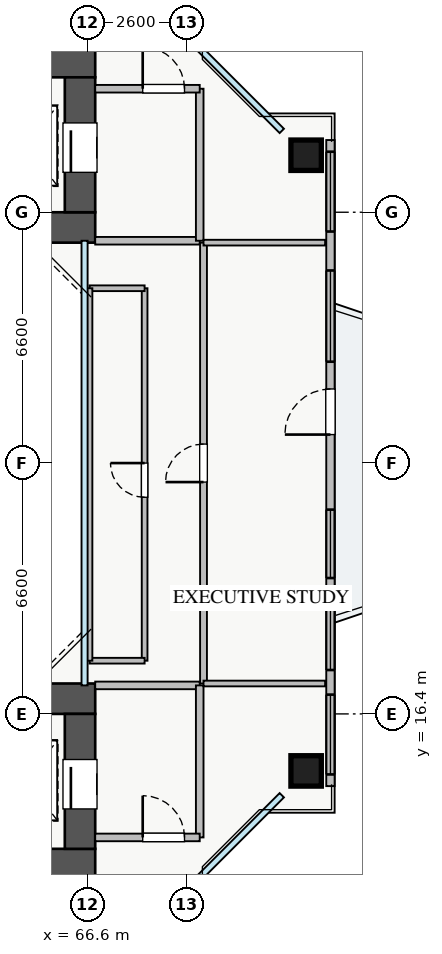
"""IFC4 building model, lengths in metres.
Left out: names, types, materials, properties, quantities, classifications, styles, units other than length and angle.
Written with IfcOpenShell. Run it as: python <this file> out.ifc"""

import sys

from ifc_helpers import new_model, si_unit, direction, frame, frame_2d, origin, origin_2d, place, context, subcontext, project, spatial, rectangle, extrude, source, transform, mapped, element, fill, save


model = new_model("IFC4")
c1 = context("Model", 3, precision=1e-05, world=origin(), true_north=direction((0.0, 1.0)))
c2 = subcontext(c1, "Body", "Model", "MODEL_VIEW")
j1 = project(units=[si_unit("LENGTHUNIT", "METRE"), si_unit("PLANEANGLEUNIT", "RADIAN")], contexts=[c1])
p1 = place(None, origin())
s1 = spatial("IfcSite", under=j1, at=p1, CompositionType="ELEMENT")
p2 = place(p1, origin())
s2 = spatial("IfcBuilding", under=s1, at=p2, CompositionType="ELEMENT")
p3 = place(p2, frame((0.0, 0.0, 73.0)))
s3 = spatial("IfcBuildingStorey", under=s2, at=p3, CompositionType="ELEMENT", Elevation=73.0)
p4 = place(p3, frame((54.2, 29.2, 0.0), z_axis=(0.0, 0.0, 1.0), x_axis=(1.0, 0.0, 0.0)))
e1 = element("IfcWall", 1, at=p4, inside=s3, PredefinedType="SHEAR", context=c2, shape_type="SweptSolid", body=[
    extrude(rectangle(XDim=12.6, YDim=0.8, at=frame_2d((6.3, 0.0))), origin(), (0.0, 0.0, 1.0), 3.25),
])
p5 = place(p3, frame((54.2, 33.55, 0.0), z_axis=(0.0, 0.0, 1.0), x_axis=(1.0, 0.0, 0.0)))
e2 = element("IfcWall", 2, at=p5, inside=s3, PredefinedType="SHEAR", context=c2, shape_type="SweptSolid", body=[
    extrude(rectangle(XDim=12.6, YDim=0.8, at=frame_2d((6.3, 0.0))), origin(), (0.0, 0.0, 1.0), 3.25),
])
p6 = place(p5, frame((8.2, 0.0, 0.0)))
e3 = element("IfcOpeningElement", 3, at=p6, cuts=e2, PredefinedType="OPENING", context=c2, shape_type="SweptSolid", body=[
    extrude(rectangle(XDim=1.1, YDim=2.05, at=frame_2d((0.55, 1.025))), frame((0.0, 0.41, 0.0), z_axis=(0.0, -1.0, 0.0), x_axis=(1.0, 0.0, 0.0)), (0.0, 0.0, 1.0), 0.82),
])
p7 = place(p3, frame((66.4, 29.6, 0.0), z_axis=(0.0, 0.0, 1.0), x_axis=(0.0, 1.0, 0.0)))
e4 = element("IfcWall", 4, at=p7, inside=s3, PredefinedType="SHEAR", context=c2, shape_type="SweptSolid", body=[
    extrude(rectangle(XDim=3.55, YDim=0.8, at=frame_2d((1.775, 0.0))), origin(), (0.0, 0.0, 1.0), 3.25),
])
p8 = place(p7, frame((1.05, 0.0, 0.0)))
e5 = element("IfcOpeningElement", 5, at=p8, cuts=e4, PredefinedType="OPENING", context=c2, shape_type="SweptSolid", body=[
    extrude(rectangle(XDim=1.3, YDim=2.05, at=frame_2d((0.65, 1.025))), frame((0.0, 0.41, 0.0), z_axis=(0.0, -1.0, 0.0), x_axis=(1.0, 0.0, 0.0)), (0.0, 0.0, 1.0), 0.82),
])
p9 = place(p3, frame((54.2, 12.45, 0.0), z_axis=(0.0, 0.0, 1.0), x_axis=(1.0, 0.0, 0.0)))
e6 = element("IfcWall", 6, at=p9, inside=s3, PredefinedType="SHEAR", context=c2, shape_type="SweptSolid", body=[
    extrude(rectangle(XDim=12.6, YDim=0.8, at=frame_2d((6.3, 0.0))), origin(), (0.0, 0.0, 1.0), 3.25),
])
p10 = place(p9, frame((8.2, 0.0, 0.0)))
e7 = element("IfcOpeningElement", 7, at=p10, cuts=e6, PredefinedType="OPENING", context=c2, shape_type="SweptSolid", body=[
    extrude(rectangle(XDim=1.1, YDim=2.05, at=frame_2d((0.55, 1.025))), frame((0.0, 0.41, 0.0), z_axis=(0.0, -1.0, 0.0), x_axis=(1.0, 0.0, 0.0)), (0.0, 0.0, 1.0), 0.82),
])
p11 = place(p3, frame((54.2, 16.8, 0.0), z_axis=(0.0, 0.0, 1.0), x_axis=(1.0, 0.0, 0.0)))
e8 = element("IfcWall", 8, at=p11, inside=s3, PredefinedType="SHEAR", context=c2, shape_type="SweptSolid", body=[
    extrude(rectangle(XDim=12.6, YDim=0.8, at=frame_2d((6.3, 0.0))), origin(), (0.0, 0.0, 1.0), 3.25),
])
p12 = place(p3, frame((66.4, 12.85, 0.0), z_axis=(0.0, 0.0, 1.0), x_axis=(0.0, 1.0, 0.0)))
e9 = element("IfcWall", 9, at=p12, inside=s3, PredefinedType="SHEAR", context=c2, shape_type="SweptSolid", body=[
    extrude(rectangle(XDim=3.55, YDim=0.8, at=frame_2d((1.775, 0.0))), origin(), (0.0, 0.0, 1.0), 3.25),
])
p13 = place(p12, frame((1.05, 0.0, 0.0)))
e10 = element("IfcOpeningElement", 10, at=p13, cuts=e9, PredefinedType="OPENING", context=c2, shape_type="SweptSolid", body=[
    extrude(rectangle(XDim=1.3, YDim=2.05, at=frame_2d((0.65, 1.025))), frame((0.0, 0.41, 0.0), z_axis=(0.0, -1.0, 0.0), x_axis=(1.0, 0.0, 0.0)), (0.0, 0.0, 1.0), 0.82),
])
m1 = source(origin(), c2, "Body", "SweptSolid", [
    extrude(rectangle(XDim=0.8, YDim=0.8, at=origin_2d()), origin(), (0.0, 0.0, 1.0), 3.25),
])
for number, where, z_axis, x_axis in (
    (11, (72.35, 14.9, 0.0), (0.0, 0.0, 1.0), (1.0, 0.0, 0.0)),
    (12, (72.35, 31.1, 0.0), (0.0, 0.0, 1.0), (1.0, 0.0, 0.0)),
):
    element("IfcColumn", number, at=place(p3, frame(where, z_axis=z_axis, x_axis=x_axis)), inside=s3, PredefinedType="COLUMN", context=c2, shape_type="MappedRepresentation", body=[
        mapped(m1, transform((0.0, 0.0, 0.0), x_axis=(1.0, 0.0, 0.0), y_axis=(0.0, 1.0, 0.0), z_axis=(0.0, 0.0, 1.0), scale=1.0)),
    ])
p14 = place(p3, frame((72.99, 14.5, 0.0), z_axis=(0.0, 0.0, 1.0), x_axis=(0.0, 1.0, 0.0)))
e13 = element("IfcWall", 13, at=p14, inside=s3, PredefinedType="STANDARD", context=c2, shape_type="SweptSolid", body=[
    extrude(rectangle(XDim=17.0, YDim=0.22, at=frame_2d((8.5, 0.0))), origin(), (0.0, 0.0, 1.0), 2.61),
])
p15 = place(p14, frame((9.25, 0.0, 0.0)))
e14 = element("IfcOpeningElement", 14, at=p15, cuts=e13, PredefinedType="OPENING", context=c2, shape_type="SweptSolid", body=[
    extrude(rectangle(XDim=1.2, YDim=2.1, at=frame_2d((0.6, 1.05))), frame((0.0, 0.12, 0.0), z_axis=(0.0, -1.0, 0.0), x_axis=(1.0, 0.0, 0.0)), (0.0, 0.0, 1.0), 0.24),
])
p16 = place(p14, frame((0.308, 0.0, 0.9)))
e15 = element("IfcOpeningElement", 15, at=p16, cuts=e13, PredefinedType="OPENING", context=c2, shape_type="SweptSolid", body=[
    extrude(rectangle(XDim=2.1, YDim=1.5, at=frame_2d((1.05, 0.75))), frame((0.0, 0.12, 0.0), z_axis=(0.0, -1.0, 0.0), x_axis=(1.0, 0.0, 0.0)), (0.0, 0.0, 1.0), 0.24),
])
p17 = place(p14, frame((5.475, 0.0, 0.9)))
e16 = element("IfcOpeningElement", 16, at=p17, cuts=e13, PredefinedType="OPENING", context=c2, shape_type="SweptSolid", body=[
    extrude(rectangle(XDim=1.8, YDim=1.45, at=frame_2d((0.9, 0.725))), frame((0.0, 0.12, 0.0), z_axis=(0.0, -1.0, 0.0), x_axis=(1.0, 0.0, 0.0)), (0.0, 0.0, 1.0), 0.24),
])
p18 = place(p14, frame((14.593, 0.0, 0.9)))
e17 = element("IfcOpeningElement", 17, at=p18, cuts=e13, PredefinedType="OPENING", context=c2, shape_type="SweptSolid", body=[
    extrude(rectangle(XDim=2.1, YDim=1.5, at=frame_2d((1.05, 0.75))), frame((0.0, 0.12, 0.0), z_axis=(0.0, -1.0, 0.0), x_axis=(1.0, 0.0, 0.0)), (0.0, 0.0, 1.0), 0.24),
])
p19 = place(p14, frame((3.055, 0.0, 0.9)))
e18 = element("IfcOpeningElement", 18, at=p19, cuts=e13, PredefinedType="OPENING", context=c2, shape_type="SweptSolid", body=[
    extrude(rectangle(XDim=2.1, YDim=1.5, at=frame_2d((1.05, 0.75))), frame((0.0, 0.12, 0.0), z_axis=(0.0, -1.0, 0.0), x_axis=(1.0, 0.0, 0.0)), (0.0, 0.0, 1.0), 0.24),
])
p20 = place(p14, frame((11.167, 0.0, 0.9)))
e19 = element("IfcOpeningElement", 19, at=p20, cuts=e13, PredefinedType="OPENING", context=c2, shape_type="SweptSolid", body=[
    extrude(rectangle(XDim=2.4, YDim=1.5, at=frame_2d((1.2, 0.75))), frame((0.0, 0.12, 0.0), z_axis=(0.0, -1.0, 0.0), x_axis=(1.0, 0.0, 0.0)), (0.0, 0.0, 1.0), 0.24),
])
p21 = place(p3, frame((66.8, 28.85, 0.0), z_axis=(0.0, 0.0, 1.0), x_axis=(1.0, 0.0, 0.0)))
e20 = element("IfcWall", 20, at=p21, inside=s3, PredefinedType="PARTITIONING", context=c2, shape_type="SweptSolid", body=[
    extrude(rectangle(XDim=2.75, YDim=0.2, at=frame_2d((1.375, 0.0))), origin(), (0.0, 0.0, 1.0), 3.07),
])
p22 = place(p3, frame((69.55, 28.85, 0.0), z_axis=(0.0, 0.0, 1.0), x_axis=(0.0, 1.0, 0.0)))
e21 = element("IfcWall", 21, at=p22, inside=s3, PredefinedType="PARTITIONING", context=c2, shape_type="SweptSolid", body=[
    extrude(rectangle(XDim=4.0, YDim=0.2, at=frame_2d((2.0, 0.0))), origin(), (0.0, 0.0, 1.0), 3.07),
])
p23 = place(p3, frame((66.8, 32.85, 0.0), z_axis=(0.0, 0.0, 1.0), x_axis=(1.0, 0.0, 0.0)))
e22 = element("IfcWall", 22, at=p23, inside=s3, PredefinedType="PARTITIONING", context=c2, shape_type="SweptSolid", body=[
    extrude(rectangle(XDim=2.75, YDim=0.2, at=frame_2d((1.375, 0.0))), origin(), (0.0, 0.0, 1.0), 3.07),
])
p24 = place(p23, frame((1.25, 0.0, 0.0)))
e23 = element("IfcOpeningElement", 23, at=p24, cuts=e22, PredefinedType="OPENING", context=c2, shape_type="SweptSolid", body=[
    extrude(rectangle(XDim=1.1, YDim=2.05, at=frame_2d((0.55, 1.025))), frame((0.0, 0.11, 0.0), z_axis=(0.0, -1.0, 0.0), x_axis=(1.0, 0.0, 0.0)), (0.0, 0.0, 1.0), 0.22),
])
p25 = place(p3, frame((66.8, 17.15, 0.0), z_axis=(0.0, 0.0, 1.0), x_axis=(1.0, 0.0, 0.0)))
e24 = element("IfcWall", 24, at=p25, inside=s3, PredefinedType="PARTITIONING", context=c2, shape_type="SweptSolid", body=[
    extrude(rectangle(XDim=2.75, YDim=0.2, at=frame_2d((1.375, 0.0))), origin(), (0.0, 0.0, 1.0), 3.07),
])
p26 = place(p3, frame((69.55, 13.15, 0.0), z_axis=(0.0, 0.0, 1.0), x_axis=(0.0, 1.0, 0.0)))
e25 = element("IfcWall", 25, at=p26, inside=s3, PredefinedType="PARTITIONING", context=c2, shape_type="SweptSolid", body=[
    extrude(rectangle(XDim=4.0, YDim=0.2, at=frame_2d((2.0, 0.0))), origin(), (0.0, 0.0, 1.0), 3.07),
])
p27 = place(p3, frame((66.8, 13.15, 0.0), z_axis=(0.0, 0.0, 1.0), x_axis=(1.0, 0.0, 0.0)))
e26 = element("IfcWall", 26, at=p27, inside=s3, PredefinedType="PARTITIONING", context=c2, shape_type="SweptSolid", body=[
    extrude(rectangle(XDim=2.75, YDim=0.2, at=frame_2d((1.375, 0.0))), origin(), (0.0, 0.0, 1.0), 3.07),
])
p28 = place(p27, frame((1.25, 0.0, 0.0)))
e27 = element("IfcOpeningElement", 27, at=p28, cuts=e26, PredefinedType="OPENING", context=c2, shape_type="SweptSolid", body=[
    extrude(rectangle(XDim=1.1, YDim=2.05, at=frame_2d((0.55, 1.025))), frame((0.0, 0.11, 0.0), z_axis=(0.0, -1.0, 0.0), x_axis=(1.0, 0.0, 0.0)), (0.0, 0.0, 1.0), 0.22),
])
p29 = place(p3, frame((69.65, 17.2, 0.0), z_axis=(0.0, 0.0, 1.0), x_axis=(0.0, 1.0, 0.0)))
e28 = element("IfcWall", 28, at=p29, inside=s3, PredefinedType="PARTITIONING", context=c2, shape_type="SweptSolid", body=[
    extrude(rectangle(XDim=11.6, YDim=0.18, at=frame_2d((5.8, 0.0))), origin(), (0.0, 0.0, 1.0), 3.07),
])
p30 = place(p29, frame((5.3, 0.0, 0.0)))
e29 = element("IfcOpeningElement", 29, at=p30, cuts=e28, PredefinedType="OPENING", context=c2, shape_type="SweptSolid", body=[
    extrude(rectangle(XDim=1.0, YDim=2.05, at=frame_2d((0.5, 1.025))), frame((0.0, 0.1, 0.0), z_axis=(0.0, -1.0, 0.0), x_axis=(1.0, 0.0, 0.0)), (0.0, 0.0, 1.0), 0.2),
])
for number, where, z_axis, x_axis in (
    (30, (69.65, 17.2, 0.0), (0.0, 0.0, 1.0), (1.0, 0.0, 0.0)),
    (31, (69.65, 28.8, 0.0), (0.0, 0.0, 1.0), (1.0, 0.0, 0.0)),
):
    element("IfcWall", number, at=place(p3, frame(where, z_axis=z_axis, x_axis=x_axis)), inside=s3, PredefinedType="PARTITIONING", context=c2, shape_type="SweptSolid", body=[
        extrude(rectangle(XDim=3.2, YDim=0.15, at=frame_2d((1.6, 0.0))), origin(), (0.0, 0.0, 1.0), 3.07),
    ])
p31 = place(p3, frame((68.1, 17.8, 0.0), z_axis=(0.0, 0.0, 1.0), x_axis=(0.0, 1.0, 0.0)))
e32 = element("IfcWall", 32, at=p31, inside=s3, PredefinedType="PARTITIONING", context=c2, shape_type="SweptSolid", body=[
    extrude(rectangle(XDim=9.8, YDim=0.15, at=frame_2d((4.9, 0.0))), origin(), (0.0, 0.0, 1.0), 3.07),
])
p32 = place(p31, frame((4.3, 0.0, 0.0)))
e33 = element("IfcOpeningElement", 33, at=p32, cuts=e32, PredefinedType="OPENING", context=c2, shape_type="SweptSolid", body=[
    extrude(rectangle(XDim=0.9, YDim=2.05, at=frame_2d((0.45, 1.025))), frame((0.0, 0.085, 0.0), z_axis=(0.0, -1.0, 0.0), x_axis=(1.0, 0.0, 0.0)), (0.0, 0.0, 1.0), 0.17),
])
p33 = place(p3, frame((66.65, 27.6, 0.0), z_axis=(0.0, 0.0, 1.0), x_axis=(1.0, 0.0, 0.0)))
e34 = element("IfcWall", 34, at=p33, inside=s3, PredefinedType="PARTITIONING", context=c2, shape_type="SweptSolid", body=[
    extrude(rectangle(XDim=1.45, YDim=0.15, at=frame_2d((0.725, 0.0))), origin(), (0.0, 0.0, 1.0), 2.865),
])
p34 = place(p3, frame((66.65, 17.8, 0.0), z_axis=(0.0, 0.0, 1.0), x_axis=(1.0, 0.0, 0.0)))
e35 = element("IfcWall", 35, at=p34, inside=s3, PredefinedType="PARTITIONING", context=c2, shape_type="SweptSolid", body=[
    extrude(rectangle(XDim=1.45, YDim=0.15, at=frame_2d((0.725, 0.0))), origin(), (0.0, 0.0, 1.0), 3.07),
])
p35 = place(p3, frame((66.65, 17.8, 0.0), z_axis=(0.0, 0.0, 1.0), x_axis=(0.0, 1.0, 0.0)))
e36 = element("IfcWall", 36, at=p35, inside=s3, PredefinedType="PARTITIONING", context=c2, shape_type="SweptSolid", body=[
    extrude(rectangle(XDim=9.8, YDim=0.15, at=frame_2d((4.9, 0.0))), origin(), (0.0, 0.0, 1.0), 2.665),
])
m2 = source(origin(), c2, "Body", "SweptSolid", [
    extrude(rectangle(XDim=1.2, YDim=2.1, at=frame_2d((0.6, 1.05))), frame((0.0, 0.025, 0.0), z_axis=(0.0, -1.0, 0.0), x_axis=(1.0, 0.0, 0.0)), (0.0, 0.0, 1.0), 0.05),
])
p36 = place(p15, origin())
e37 = element("IfcDoor", 37, at=p36, inside=s3, OperationType="SINGLE_SWING_LEFT", PredefinedType="DOOR", context=c2, shape_type="MappedRepresentation", body=[
    mapped(m2, transform((0.0, 0.0, 0.0), x_axis=(1.0, 0.0, 0.0), y_axis=(0.0, 1.0, 0.0), z_axis=(0.0, 0.0, 1.0), scale=1.0)),
])
fill(e14, e37)
m3 = source(origin(), c2, "Body", "SweptSolid", [
    extrude(rectangle(XDim=2.1, YDim=1.5, at=frame_2d((1.05, 0.75))), frame((0.0, 0.03, 0.0), z_axis=(0.0, -1.0, 0.0), x_axis=(1.0, 0.0, 0.0)), (0.0, 0.0, 1.0), 0.06),
])
p37 = place(p16, origin())
e38 = element("IfcWindow", 38, at=p37, inside=s3, PartitioningType="TRIPLE_PANEL_VERTICAL", PredefinedType="WINDOW", context=c2, shape_type="MappedRepresentation", body=[
    mapped(m3, transform((0.0, 0.0, 0.0), x_axis=(1.0, 0.0, 0.0), y_axis=(0.0, 1.0, 0.0), z_axis=(0.0, 0.0, 1.0), scale=1.0)),
])
fill(e15, e38)
m4 = source(origin(), c2, "Body", "SweptSolid", [
    extrude(rectangle(XDim=1.8, YDim=1.45, at=frame_2d((0.9, 0.725))), frame((0.0, 0.03, 0.0), z_axis=(0.0, -1.0, 0.0), x_axis=(1.0, 0.0, 0.0)), (0.0, 0.0, 1.0), 0.06),
])
p38 = place(p17, origin())
e39 = element("IfcWindow", 39, at=p38, inside=s3, PartitioningType="DOUBLE_PANEL_VERTICAL", PredefinedType="WINDOW", context=c2, shape_type="MappedRepresentation", body=[
    mapped(m4, transform((0.0, 0.0, 0.0), x_axis=(1.0, 0.0, 0.0), y_axis=(0.0, 1.0, 0.0), z_axis=(0.0, 0.0, 1.0), scale=1.0)),
])
fill(e16, e39)
p39 = place(p18, origin())
e40 = element("IfcWindow", 40, at=p39, inside=s3, PartitioningType="TRIPLE_PANEL_VERTICAL", PredefinedType="WINDOW", context=c2, shape_type="MappedRepresentation", body=[
    mapped(m3, transform((0.0, 0.0, 0.0), x_axis=(1.0, 0.0, 0.0), y_axis=(0.0, 1.0, 0.0), z_axis=(0.0, 0.0, 1.0), scale=1.0)),
])
fill(e17, e40)
m5 = source(origin(), c2, "Body", "SweptSolid", [
    extrude(rectangle(XDim=1.3, YDim=2.05, at=frame_2d((0.65, 1.025))), frame((0.0, 0.025, 0.0), z_axis=(0.0, -1.0, 0.0), x_axis=(1.0, 0.0, 0.0)), (0.0, 0.0, 1.0), 0.05),
])
p40 = place(p8, origin())
e41 = element("IfcDoor", 41, at=p40, inside=s3, OperationType="SLIDING_TO_LEFT", PredefinedType="DOOR", context=c2, shape_type="MappedRepresentation", body=[
    mapped(m5, transform((0.0, 0.0, 0.0), x_axis=(1.0, 0.0, 0.0), y_axis=(0.0, 1.0, 0.0), z_axis=(0.0, 0.0, 1.0), scale=1.0)),
])
fill(e5, e41)
p41 = place(p13, origin())
e42 = element("IfcDoor", 42, at=p41, inside=s3, OperationType="SLIDING_TO_RIGHT", PredefinedType="DOOR", context=c2, shape_type="MappedRepresentation", body=[
    mapped(m5, transform((0.0, 0.0, 0.0), x_axis=(1.0, 0.0, 0.0), y_axis=(0.0, 1.0, 0.0), z_axis=(0.0, 0.0, 1.0), scale=1.0)),
])
fill(e10, e42)
m6 = source(origin(), c2, "Body", "SweptSolid", [
    extrude(rectangle(XDim=1.1, YDim=2.05, at=frame_2d((0.55, 1.025))), frame((0.0, 0.025, 0.0), z_axis=(0.0, -1.0, 0.0), x_axis=(1.0, 0.0, 0.0)), (0.0, 0.0, 1.0), 0.05),
])
p42 = place(p24, origin())
e43 = element("IfcDoor", 43, at=p42, inside=s3, OperationType="SINGLE_SWING_LEFT", PredefinedType="DOOR", context=c2, shape_type="MappedRepresentation", body=[
    mapped(m6, transform((0.0, 0.0, 0.0), x_axis=(1.0, 0.0, 0.0), y_axis=(0.0, 1.0, 0.0), z_axis=(0.0, 0.0, 1.0), scale=1.0)),
])
fill(e23, e43)
p43 = place(p28, origin())
e44 = element("IfcDoor", 44, at=p43, inside=s3, OperationType="SINGLE_SWING_LEFT", PredefinedType="DOOR", context=c2, shape_type="MappedRepresentation", body=[
    mapped(m6, transform((0.0, 0.0, 0.0), x_axis=(1.0, 0.0, 0.0), y_axis=(0.0, 1.0, 0.0), z_axis=(0.0, 0.0, 1.0), scale=1.0)),
])
fill(e27, e44)
m7 = source(origin(), c2, "Body", "SweptSolid", [
    extrude(rectangle(XDim=1.0, YDim=2.05, at=frame_2d((0.5, 1.025))), frame((0.0, 0.025, 0.0), z_axis=(0.0, -1.0, 0.0), x_axis=(1.0, 0.0, 0.0)), (0.0, 0.0, 1.0), 0.05),
])
p44 = place(p30, origin())
e45 = element("IfcDoor", 45, at=p44, inside=s3, OperationType="SINGLE_SWING_LEFT", PredefinedType="DOOR", context=c2, shape_type="MappedRepresentation", body=[
    mapped(m7, transform((0.0, 0.0, 0.0), x_axis=(1.0, 0.0, 0.0), y_axis=(0.0, 1.0, 0.0), z_axis=(0.0, 0.0, 1.0), scale=1.0)),
])
fill(e29, e45)
m8 = source(origin(), c2, "Body", "SweptSolid", [
    extrude(rectangle(XDim=0.9, YDim=2.05, at=frame_2d((0.45, 1.025))), frame((0.0, 0.025, 0.0), z_axis=(0.0, -1.0, 0.0), x_axis=(1.0, 0.0, 0.0)), (0.0, 0.0, 1.0), 0.05),
])
p45 = place(p32, origin())
e46 = element("IfcDoor", 46, at=p45, inside=s3, OperationType="SINGLE_SWING_RIGHT", PredefinedType="DOOR", context=c2, shape_type="MappedRepresentation", body=[
    mapped(m8, transform((0.0, 0.0, 0.0), x_axis=(1.0, 0.0, 0.0), y_axis=(0.0, 1.0, 0.0), z_axis=(0.0, 0.0, 1.0), scale=1.0)),
])
fill(e33, e46)
p46 = place(p19, origin())
e47 = element("IfcWindow", 47, at=p46, inside=s3, PartitioningType="TRIPLE_PANEL_VERTICAL", PredefinedType="WINDOW", context=c2, shape_type="MappedRepresentation", body=[
    mapped(m3, transform((0.0, 0.0, 0.0), x_axis=(1.0, 0.0, 0.0), y_axis=(0.0, 1.0, 0.0), z_axis=(0.0, 0.0, 1.0), scale=1.0)),
])
fill(e18, e47)
m9 = source(origin(), c2, "Body", "SweptSolid", [
    extrude(rectangle(XDim=2.4, YDim=1.5, at=frame_2d((1.2, 0.75))), frame((0.0, 0.03, 0.0), z_axis=(0.0, -1.0, 0.0), x_axis=(1.0, 0.0, 0.0)), (0.0, 0.0, 1.0), 0.06),
])
p47 = place(p20, origin())
e48 = element("IfcWindow", 48, at=p47, inside=s3, PartitioningType="TRIPLE_PANEL_VERTICAL", PredefinedType="WINDOW", context=c2, shape_type="MappedRepresentation", body=[
    mapped(m9, transform((0.0, 0.0, 0.0), x_axis=(1.0, 0.0, 0.0), y_axis=(0.0, 1.0, 0.0), z_axis=(0.0, 0.0, 1.0), scale=1.0)),
])
fill(e19, e48)
save(model, sys.argv[1])
